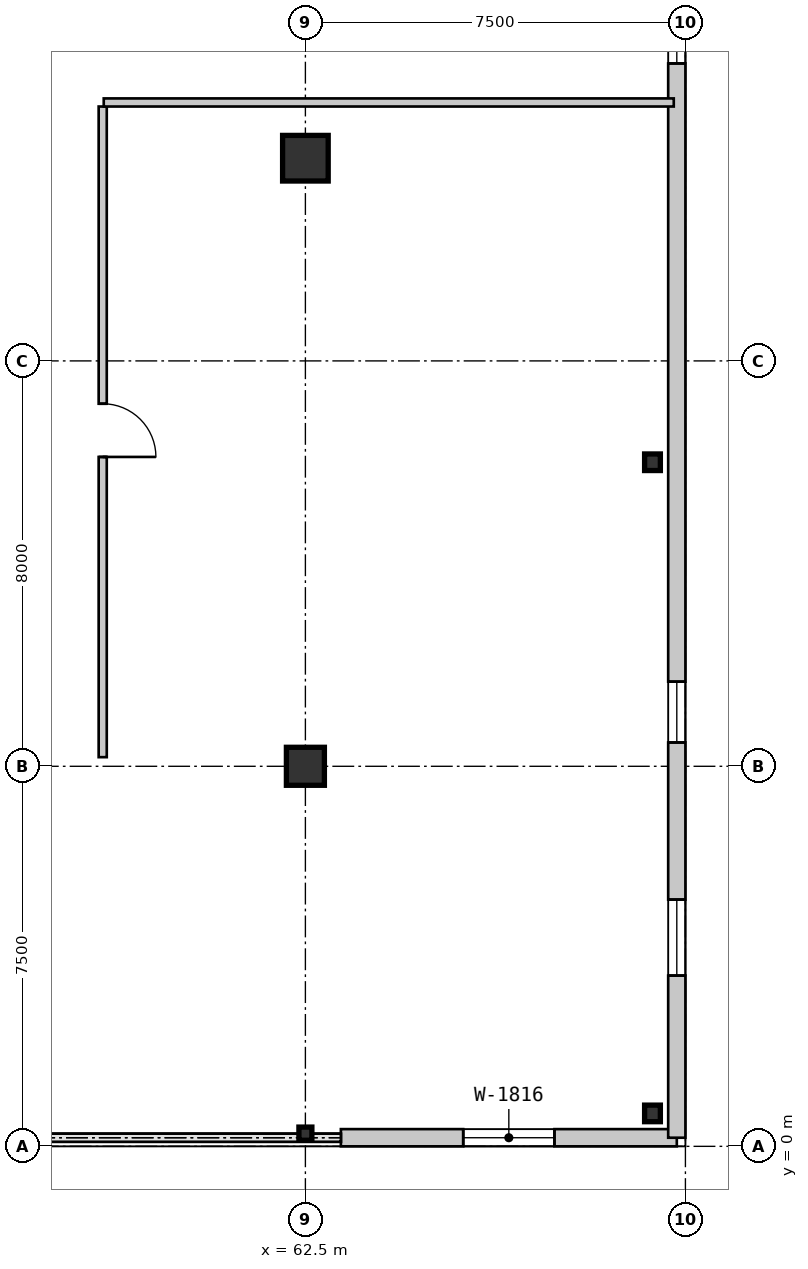
"""IFC4 building model, lengths in metres.
Left out: names, types, materials, properties, quantities, classifications, styles, units other than length and angle.
Written with IfcOpenShell. Run it as: python <this file> out.ifc"""

import sys

from ifc_helpers import new_model, si_unit, direction, frame, frame_2d, origin, origin_2d, place, context, subcontext, project, spatial, rectangle, circle, i_section, extrude, source, transform, mapped, element, fill, save


model = new_model("IFC4")
c1 = context("Model", 3, precision=1e-05, world=origin(), true_north=direction((0.0, 1.0)))
c2 = subcontext(c1, "Body", "Model", "MODEL_VIEW")
j1 = project(units=[si_unit("LENGTHUNIT", "METRE"), si_unit("PLANEANGLEUNIT", "RADIAN")], contexts=[c1])
p1 = place(None, origin())
s1 = spatial("IfcSite", under=j1, at=p1, CompositionType="ELEMENT")
p2 = place(p1, origin())
s2 = spatial("IfcBuilding", under=s1, at=p2, CompositionType="ELEMENT")
p3 = place(p2, frame((0.0, 0.0, 12.95)))
s3 = spatial("IfcBuildingStorey", under=s2, at=p3, CompositionType="ELEMENT", Elevation=12.95)
m1 = source(origin(), c2, "Body", "SweptSolid", [
    extrude(circle(Radius=0.375, at=origin_2d()), origin(), (0.0, 0.0, 1.0), 3.85),
])
p4 = place(p3, frame((62.5, 7.5, 0.0), z_axis=(0.0, 0.0, 1.0), x_axis=(1.0, 0.0, 0.0)))
e1 = element("IfcColumn", 1, at=p4, inside=s3, PredefinedType="COLUMN", context=c2, shape_type="MappedRepresentation", body=[
    mapped(m1, transform((0.0, 0.0, 0.0), scale=1.0)),
])
m2 = source(origin(), c2, "Body", "SweptSolid", [
    extrude(circle(Radius=0.45, at=origin_2d()), origin(), (0.0, 0.0, 1.0), 3.85),
])
p5 = place(p3, frame((62.5, 19.5, 0.0), z_axis=(0.0, 0.0, 1.0), x_axis=(1.0, 0.0, 0.0)))
e2 = element("IfcColumn", 2, at=p5, inside=s3, PredefinedType="COLUMN", context=c2, shape_type="MappedRepresentation", body=[
    mapped(m2, transform((0.0, 0.0, 0.0), scale=1.0)),
])
m3 = source(origin(), c2, "Body", "SweptSolid", [
    extrude(i_section(OverallWidth=0.311, OverallDepth=0.327, WebThickness=0.016, FlangeThickness=0.025, at=origin_2d()), origin(), (0.0, 0.0, 1.0), 3.85),
])
for number, where, z_axis, x_axis in (
    (3, (69.35, 0.65, 0.0), (0.0, 0.0, 1.0), (1.0, 0.0, 0.0)),
    (4, (69.35, 13.5, 0.0), (0.0, 0.0, 1.0), (1.0, 0.0, 0.0)),
):
    element("IfcColumn", number, at=place(p3, frame(where, z_axis=z_axis, x_axis=x_axis)), inside=s3, PredefinedType="COLUMN", context=c2, shape_type="MappedRepresentation", body=[
        mapped(m3, transform((0.0, 0.0, 0.0), scale=1.0)),
    ])
m4 = source(origin(), c2, "Body", "SweptSolid", [
    extrude(i_section(OverallWidth=0.256, OverallDepth=0.26, WebThickness=0.01, FlangeThickness=0.017, at=origin_2d()), origin(), (0.0, 0.0, 1.0), 3.85),
])
p6 = place(p3, frame((62.5, 0.25, 0.0), z_axis=(0.0, 0.0, 1.0), x_axis=(1.0, 0.0, 0.0)))
e5 = element("IfcColumn", 5, at=p6, inside=s3, PredefinedType="PILASTER", context=c2, shape_type="MappedRepresentation", body=[
    mapped(m4, transform((0.0, 0.0, 0.0), scale=1.0)),
])
m5 = source(origin(), c2, "Body", "SweptSolid", [
    extrude(rectangle(XDim=6.63, YDim=0.34, at=frame_2d((3.315, 0.0))), origin(), (0.0, 0.0, 1.0), 3.43),
])
p7 = place(p3, frame((63.2, 0.17, 0.0), z_axis=(0.0, 0.0, 1.0), x_axis=(1.0, 0.0, 0.0)))
e6 = element("IfcWall", 6, at=p7, inside=s3, PredefinedType="SOLIDWALL", context=c2, shape_type="MappedRepresentation", body=[
    mapped(m5, transform((0.0, 0.0, 0.0), scale=1.0)),
])
m6 = source(origin(), c2, "Body", "SweptSolid", [
    extrude(rectangle(XDim=1.8, YDim=1.6, at=frame_2d((0.9, 0.8))), frame((0.0, 0.18, 0.0), z_axis=(0.0, -1.0, 0.0), x_axis=(1.0, 0.0, 0.0)), (0.0, 0.0, 1.0), 0.36),
])
p8 = place(p7, frame((2.415, 0.0, 0.55)))
e7 = element("IfcOpeningElement", 7, at=p8, cuts=e6, PredefinedType="OPENING", context=c2, shape_type="MappedRepresentation", body=[
    mapped(m6, transform((0.0, 0.0, 0.0), scale=1.0)),
])
m7 = source(origin(), c2, "Body", "SweptSolid", [
    extrude(rectangle(XDim=39.66, YDim=0.34, at=frame_2d((19.83, 0.0))), origin(), (0.0, 0.0, 1.0), 3.43),
])
p9 = place(p3, frame((69.83, 0.17, 0.0), z_axis=(0.0, 0.0, 1.0), x_axis=(0.0, 1.0, 0.0)))
e8 = element("IfcWall", 8, at=p9, inside=s3, PredefinedType="SOLIDWALL", context=c2, shape_type="MappedRepresentation", body=[
    mapped(m7, transform((0.0, 0.0, 0.0), scale=1.0)),
])
m8 = source(origin(), c2, "Body", "SweptSolid", [
    extrude(rectangle(XDim=1.5, YDim=1.5, at=frame_2d((0.75, 0.75))), frame((0.0, 0.18, 0.0), z_axis=(0.0, -1.0, 0.0), x_axis=(1.0, 0.0, 0.0)), (0.0, 0.0, 1.0), 0.36),
])
p10 = place(p9, frame((3.2, 0.0, 0.55)))
e9 = element("IfcOpeningElement", 9, at=p10, cuts=e8, PredefinedType="OPENING", context=c2, shape_type="MappedRepresentation", body=[
    mapped(m8, transform((0.0, 0.0, 0.0), scale=1.0)),
])
m9 = source(origin(), c2, "Body", "SweptSolid", [
    extrude(rectangle(XDim=1.2, YDim=1.5, at=frame_2d((0.6, 0.75))), frame((0.0, 0.18, 0.0), z_axis=(0.0, -1.0, 0.0), x_axis=(1.0, 0.0, 0.0)), (0.0, 0.0, 1.0), 0.36),
])
p11 = place(p9, frame((7.8, 0.0, 0.55)))
e10 = element("IfcOpeningElement", 10, at=p11, cuts=e8, PredefinedType="OPENING", context=c2, shape_type="MappedRepresentation", body=[
    mapped(m9, transform((0.0, 0.0, 0.0), scale=1.0)),
])
m10 = source(origin(), c2, "Body", "SweptSolid", [
    extrude(rectangle(XDim=2.4, YDim=1.8, at=frame_2d((1.2, 0.9))), frame((0.0, 0.18, 0.0), z_axis=(0.0, -1.0, 0.0), x_axis=(1.0, 0.0, 0.0)), (0.0, 0.0, 1.0), 0.36),
])
p12 = place(p9, frame((21.2, 0.0, 0.55)))
e11 = element("IfcOpeningElement", 11, at=p12, cuts=e8, PredefinedType="OPENING", context=c2, shape_type="MappedRepresentation", body=[
    mapped(m10, transform((0.0, 0.0, 0.0), scale=1.0)),
])
p13 = place(p9, frame((34.6, 0.0, 0.55)))
e12 = element("IfcOpeningElement", 12, at=p13, cuts=e8, PredefinedType="OPENING", context=c2, shape_type="MappedRepresentation", body=[
    mapped(m6, transform((0.0, 0.0, 0.0), scale=1.0)),
])
m11 = source(origin(), c2, "Body", "SweptSolid", [
    extrude(rectangle(XDim=12.84, YDim=0.16, at=frame_2d((6.42, 0.0))), origin(), (0.0, 0.0, 1.0), 3.43),
])
p14 = place(p3, frame((58.5, 20.52, 0.0), z_axis=(0.0, 0.0, 1.0), x_axis=(0.0, -1.0, 0.0)))
e13 = element("IfcWall", 13, at=p14, inside=s3, PredefinedType="PARTITIONING", context=c2, shape_type="MappedRepresentation", body=[
    mapped(m11, transform((0.0, 0.0, 0.0), scale=1.0)),
])
m12 = source(origin(), c2, "Body", "SweptSolid", [
    extrude(rectangle(XDim=1.05, YDim=2.1, at=frame_2d((0.525, 1.05))), frame((0.0, 0.09, 0.0), z_axis=(0.0, -1.0, 0.0), x_axis=(1.0, 0.0, 0.0)), (0.0, 0.0, 1.0), 0.18),
])
p15 = place(p14, frame((5.865, 0.0, 0.0)))
e14 = element("IfcOpeningElement", 14, at=p15, cuts=e13, PredefinedType="OPENING", context=c2, shape_type="MappedRepresentation", body=[
    mapped(m12, transform((0.0, 0.0, 0.0), scale=1.0)),
])
m13 = source(origin(), c2, "Body", "SweptSolid", [
    extrude(rectangle(XDim=11.25, YDim=0.16, at=frame_2d((5.625, 0.0))), origin(), (0.0, 0.0, 1.0), 3.43),
])
p16 = place(p3, frame((69.77, 20.6, 0.0), z_axis=(0.0, 0.0, 1.0), x_axis=(-1.0, 0.0, 0.0)))
e15 = element("IfcWall", 15, at=p16, inside=s3, PredefinedType="PARTITIONING", context=c2, shape_type="MappedRepresentation", body=[
    mapped(m13, transform((0.0, 0.0, 0.0), scale=1.0)),
])
m14 = source(origin(), c2, "Body", "SweptSolid", [
    extrude(rectangle(XDim=1.8, YDim=1.6, at=frame_2d((0.9, 0.8))), frame((0.0, 0.03, 0.0), z_axis=(0.0, -1.0, 0.0), x_axis=(1.0, 0.0, 0.0)), (0.0, 0.0, 1.0), 0.06),
])
p17 = place(p8, origin())
e16 = element("IfcWindow", 16, at=p17, inside=s3, PartitioningType="SINGLE_PANEL", PredefinedType="WINDOW", context=c2, shape_type="MappedRepresentation", body=[
    mapped(m14, transform((0.0, 0.0, 0.0), scale=1.0)),
])
fill(e7, e16)
m15 = source(origin(), c2, "Body", "SweptSolid", [
    extrude(rectangle(XDim=1.5, YDim=1.5, at=frame_2d((0.75, 0.75))), frame((0.0, 0.03, 0.0), z_axis=(0.0, -1.0, 0.0), x_axis=(1.0, 0.0, 0.0)), (0.0, 0.0, 1.0), 0.06),
])
p18 = place(p10, origin())
e17 = element("IfcWindow", 17, at=p18, inside=s3, PartitioningType="SINGLE_PANEL", PredefinedType="WINDOW", context=c2, shape_type="MappedRepresentation", body=[
    mapped(m15, transform((0.0, 0.0, 0.0), scale=1.0)),
])
fill(e9, e17)
m16 = source(origin(), c2, "Body", "SweptSolid", [
    extrude(rectangle(XDim=1.2, YDim=1.5, at=frame_2d((0.6, 0.75))), frame((0.0, 0.03, 0.0), z_axis=(0.0, -1.0, 0.0), x_axis=(1.0, 0.0, 0.0)), (0.0, 0.0, 1.0), 0.06),
])
p19 = place(p11, origin())
e18 = element("IfcWindow", 18, at=p19, inside=s3, PartitioningType="SINGLE_PANEL", PredefinedType="WINDOW", context=c2, shape_type="MappedRepresentation", body=[
    mapped(m16, transform((0.0, 0.0, 0.0), scale=1.0)),
])
fill(e10, e18)
m17 = source(origin(), c2, "Body", "SweptSolid", [
    extrude(rectangle(XDim=2.4, YDim=1.8, at=frame_2d((1.2, 0.9))), frame((0.0, 0.03, 0.0), z_axis=(0.0, -1.0, 0.0), x_axis=(1.0, 0.0, 0.0)), (0.0, 0.0, 1.0), 0.06),
])
p20 = place(p12, origin())
e19 = element("IfcWindow", 19, at=p20, inside=s3, PartitioningType="SINGLE_PANEL", PredefinedType="WINDOW", context=c2, shape_type="MappedRepresentation", body=[
    mapped(m17, transform((0.0, 0.0, 0.0), scale=1.0)),
])
fill(e11, e19)
m18 = source(origin(), c2, "Body", "SweptSolid", [
    extrude(rectangle(XDim=1.05, YDim=2.1, at=frame_2d((0.525, 1.05))), frame((0.0, 0.025, 0.0), z_axis=(0.0, -1.0, 0.0), x_axis=(1.0, 0.0, 0.0)), (0.0, 0.0, 1.0), 0.05),
])
p21 = place(p15, origin())
e20 = element("IfcDoor", 20, at=p21, inside=s3, OperationType="SINGLE_SWING_RIGHT", PredefinedType="DOOR", context=c2, shape_type="MappedRepresentation", body=[
    mapped(m18, transform((0.0, 0.0, 0.0), scale=1.0)),
])
fill(e14, e20)
save(model, sys.argv[1])
